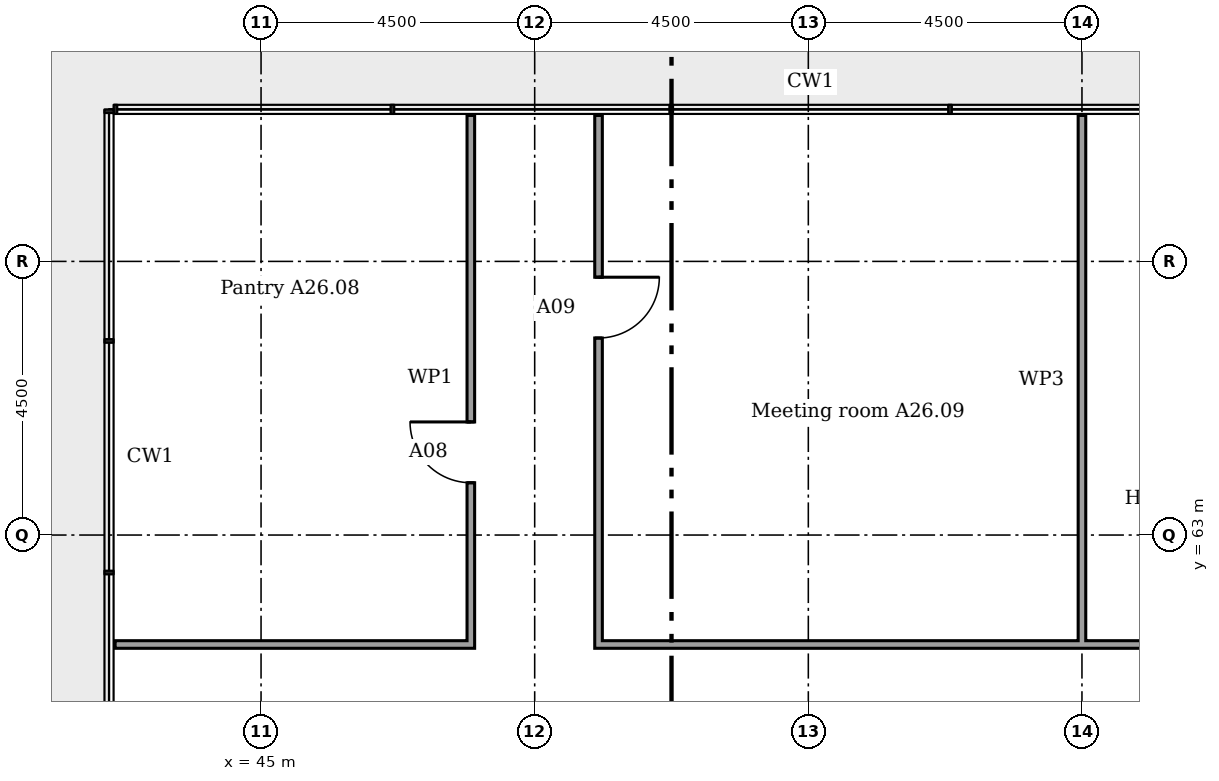
"""IFC4 building model, lengths in metres.
Left out: names, types, materials, properties, quantities, classifications, styles, units other than length and angle.
Written with IfcOpenShell. Run it as: python <this file> out.ifc"""

import sys

from ifc_helpers import new_model, si_unit, direction, frame, frame_2d, origin, place, context, subcontext, project, spatial, rectangle, extrude, element, fill, save


model = new_model("IFC4")
c1 = context("Model", 3, precision=1e-05, world=origin(), true_north=direction((0.0, 1.0)))
c2 = subcontext(c1, "Body", "Model", "MODEL_VIEW")
j1 = project(units=[si_unit("LENGTHUNIT", "METRE"), si_unit("PLANEANGLEUNIT", "RADIAN")], contexts=[c1])
p1 = place(None, origin())
s1 = spatial("IfcSite", under=j1, at=p1, CompositionType="ELEMENT")
p2 = place(p1, origin())
s2 = spatial("IfcBuilding", under=s1, at=p2, CompositionType="ELEMENT")
p3 = place(p2, frame((0.0, 0.0, 106.4)))
s3 = spatial("IfcBuildingStorey", under=s2, at=p3, CompositionType="ELEMENT", Elevation=106.4)
p4 = place(p3, frame((42.6, 61.2, 0.0)))
e1 = element("IfcWall", 1, at=p4, inside=s3, PredefinedType="PARTITIONING", context=c2, shape_type="SweptSolid", body=[
    extrude(rectangle(XDim=5.912, YDim=0.125, at=frame_2d((2.956, 0.0))), origin(), (0.0, 0.0, 1.0), 3.45),
])
p5 = place(p3, frame((50.488, 61.2, 0.0)))
e2 = element("IfcWall", 2, at=p5, inside=s3, PredefinedType="PARTITIONING", context=c2, shape_type="SweptSolid", body=[
    extrude(rectangle(XDim=10.475, YDim=0.125, at=frame_2d((5.237, 0.0))), origin(), (0.0, 0.0, 1.0), 3.45),
])
p6 = place(p3, frame((48.45, 61.262, 0.0), z_axis=(0.0, 0.0, 1.0), x_axis=(0.0, 1.0, 0.0)))
e3 = element("IfcWall", 3, at=p6, inside=s3, PredefinedType="PARTITIONING", context=c2, shape_type="SweptSolid", body=[
    extrude(rectangle(XDim=8.637, YDim=0.125, at=frame_2d((4.319, 0.0))), origin(), (0.0, 0.0, 1.0), 3.45),
])
p7 = place(p6, frame((2.597, 0.0, 0.0)))
e4 = element("IfcOpeningElement", 4, at=p7, cuts=e3, PredefinedType="OPENING", context=c2, shape_type="SweptSolid", body=[
    extrude(rectangle(XDim=1.0, YDim=2.1, at=frame_2d((0.5, 1.05))), frame((0.0, 0.073, 0.0), z_axis=(0.0, -1.0, 0.0), x_axis=(1.0, 0.0, 0.0)), (0.0, 0.0, 1.0), 0.145),
])
p8 = place(p3, frame((50.55, 61.262, 0.0), z_axis=(0.0, 0.0, 1.0), x_axis=(0.0, 1.0, 0.0)))
e5 = element("IfcWall", 5, at=p8, inside=s3, PredefinedType="PARTITIONING", context=c2, shape_type="SweptSolid", body=[
    extrude(rectangle(XDim=8.637, YDim=0.125, at=frame_2d((4.319, 0.0))), origin(), (0.0, 0.0, 1.0), 3.45),
])
p9 = place(p8, frame((4.978, 0.0, 0.0)))
e6 = element("IfcOpeningElement", 6, at=p9, cuts=e5, PredefinedType="OPENING", context=c2, shape_type="SweptSolid", body=[
    extrude(rectangle(XDim=1.0, YDim=2.1, at=frame_2d((0.5, 1.05))), frame((0.0, 0.073, 0.0), z_axis=(0.0, -1.0, 0.0), x_axis=(1.0, 0.0, 0.0)), (0.0, 0.0, 1.0), 0.145),
])
p10 = place(p3, frame((58.5, 61.2, 0.0), z_axis=(0.0, 0.0, 1.0), x_axis=(0.0, 1.0, 0.0)))
e7 = element("IfcWall", 7, at=p10, inside=s3, PredefinedType="MOVABLE", context=c2, shape_type="SweptSolid", body=[
    extrude(rectangle(XDim=8.7, YDim=0.125, at=frame_2d((4.35, 0.0))), origin(), (0.0, 0.0, 1.0), 2.766),
])
p11 = place(p7, origin())
e8 = element("IfcDoor", 8, at=p11, inside=s3, OperationType="SINGLE_SWING_LEFT", PredefinedType="DOOR", context=c2, shape_type="SweptSolid", body=[
    extrude(rectangle(XDim=1.0, YDim=2.1, at=frame_2d((0.5, 1.05))), frame((0.0, 0.025, 0.0), z_axis=(0.0, -1.0, 0.0), x_axis=(1.0, 0.0, 0.0)), (0.0, 0.0, 1.0), 0.05),
])
fill(e4, e8)
p12 = place(p9, frame((1.0, 0.0, 0.0), x_axis=(-1.0, 0.0, 0.0)))
e9 = element("IfcDoor", 9, at=p12, inside=s3, OperationType="SINGLE_SWING_RIGHT", PredefinedType="DOOR", context=c2, shape_type="SweptSolid", body=[
    extrude(rectangle(XDim=1.0, YDim=2.1, at=frame_2d((0.5, 1.05))), frame((0.0, 0.025, 0.0), z_axis=(0.0, -1.0, 0.0), x_axis=(1.0, 0.0, 0.0)), (0.0, 0.0, 1.0), 0.05),
])
fill(e6, e9)
save(model, sys.argv[1])
